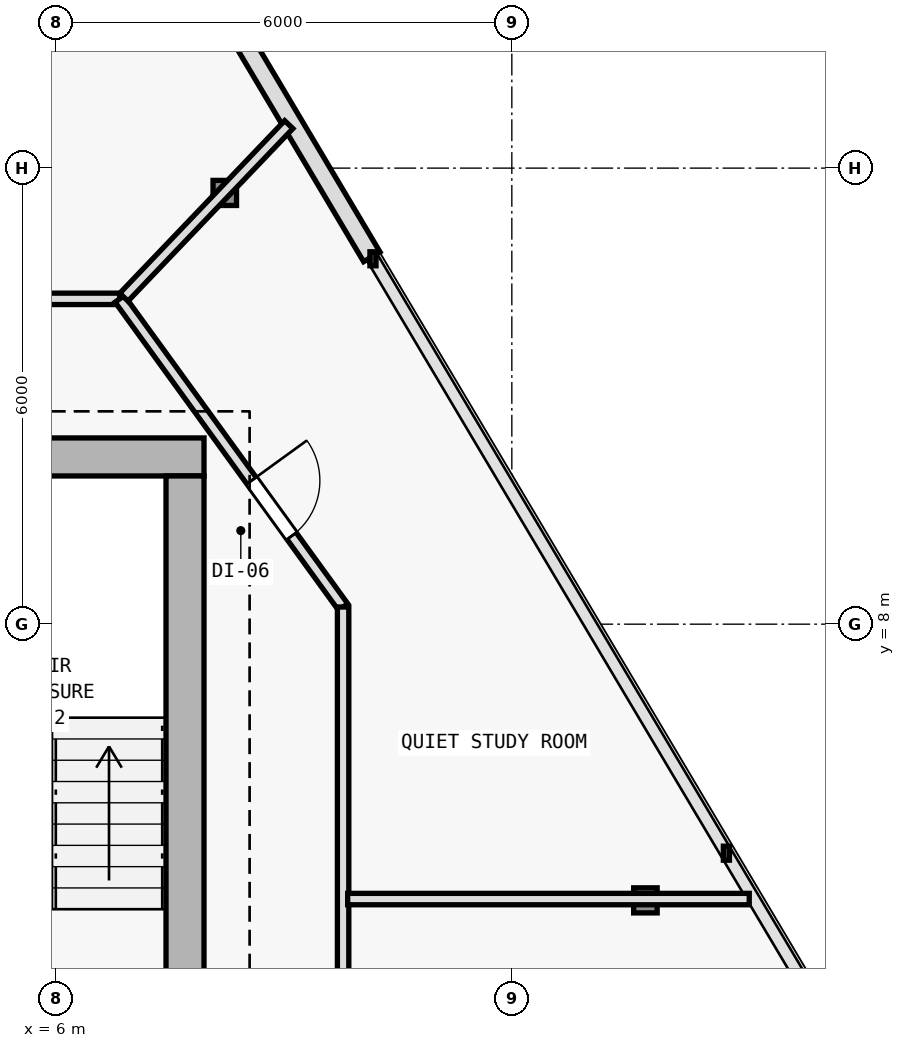
"""IFC4 building model, lengths in metres.
Left out: names, types, materials, properties, quantities, classifications, styles, units other than length and angle.
Written with IfcOpenShell. Run it as: python <this file> out.ifc"""

import sys

from ifc_helpers import new_model, si_unit, direction, frame, frame_2d, origin, origin_2d, place, context, subcontext, project, spatial, rectangle, i_section, extrude, element, fill, save


model = new_model("IFC4")
c1 = context("Model", 3, precision=1e-05, world=origin(), true_north=direction((0.0, 1.0)))
c2 = subcontext(c1, "Body", "Model", "MODEL_VIEW")
j1 = project(units=[si_unit("LENGTHUNIT", "METRE"), si_unit("PLANEANGLEUNIT", "RADIAN")], contexts=[c1])
p1 = place(None, origin())
s1 = spatial("IfcSite", under=j1, at=p1, CompositionType="ELEMENT")
p2 = place(p1, origin())
s2 = spatial("IfcBuilding", under=s1, at=p2, CompositionType="ELEMENT")
p3 = place(p2, frame((0.0, 0.0, 261.6)))
s3 = spatial("IfcBuildingStorey", under=s2, at=p3, CompositionType="ELEMENT", Elevation=261.6)
p4 = place(p3, frame((7.7, 10.2, 0.0), z_axis=(0.0, 0.0, 1.0), x_axis=(1.0, 0.0, 0.0)))
e1 = element("IfcColumn", 1, at=p4, inside=s3, PredefinedType="COLUMN", context=c2, shape_type="SweptSolid", body=[
    extrude(i_section(OverallWidth=0.374, OverallDepth=0.372, WebThickness=0.012, FlangeThickness=0.02, FilletRadius=0.015, at=origin_2d()), origin(), (0.0, 0.0, 1.0), 3.6),
])
p5 = place(p3, frame((13.757, 4.366, 0.005), z_axis=(-0.018906041, 0.009521027842, 0.999775930718), x_axis=(-0.449781931574, -0.893138406984, 0.0)))
e2 = element("IfcColumn", 2, at=p5, inside=s3, PredefinedType="COLUMN", context=c2, shape_type="SweptSolid", body=[
    extrude(i_section(OverallWidth=0.309, OverallDepth=0.33, WebThickness=0.011, FlangeThickness=0.019, FilletRadius=0.027, at=origin_2d()), origin(), (0.0, 0.0, 1.0), 3.59),
])
p6 = place(p3, frame((8.223, 13.674, 0.005), z_axis=(-0.011767052893, -0.002584670578, 0.999927425339), x_axis=(0.214538664031, -0.976715496773, 0.0)))
e3 = element("IfcColumn", 3, at=p6, inside=s3, PredefinedType="COLUMN", context=c2, shape_type="SweptSolid", body=[
    extrude(i_section(OverallWidth=0.309, OverallDepth=0.33, WebThickness=0.011, FlangeThickness=0.019, FilletRadius=0.027, at=origin_2d()), origin(), (0.0, 0.0, 1.0), 3.589),
])
p7 = place(p3, frame((5.24, 21.103, 0.0), z_axis=(0.0, 0.0, 1.0), x_axis=(0.511088566076, -0.859528055171, 0.0)))
e4 = element("IfcWall", 4, at=p7, inside=s3, PredefinedType="SOLIDWALL", context=c2, shape_type="SweptSolid", body=[
    extrude(rectangle(XDim=9.622, YDim=0.25, at=frame_2d((4.811, 0.0))), origin(), (0.0, 0.0, 1.0), 3.35),
])
p8 = place(p7, frame((4.261, 0.0, 0.62)))
e5 = element("IfcOpeningElement", 5, at=p8, cuts=e4, PredefinedType="OPENING", context=c2, shape_type="SweptSolid", body=[
    extrude(rectangle(XDim=1.1, YDim=1.8, at=frame_2d((0.55, 0.9))), frame((0.0, 0.135, 0.0), z_axis=(0.0, -1.0, 0.0), x_axis=(1.0, 0.0, 0.0)), (0.0, 0.0, 1.0), 0.27),
])
p9 = place(p3, frame((7.95, 10.2, 0.0), z_axis=(0.0, 0.0, 1.0), x_axis=(-1.0, 0.0, 0.0)))
e6 = element("IfcWall", 6, at=p9, inside=s3, PredefinedType="SHEAR", context=c2, shape_type="SweptSolid", body=[
    extrude(rectangle(XDim=15.9, YDim=0.5, at=frame_2d((7.95, 0.0))), origin(), (0.0, 0.0, 1.0), 3.35),
])
p10 = place(p9, frame((4.4, 0.0, 0.0)))
e7 = element("IfcOpeningElement", 7, at=p10, cuts=e6, PredefinedType="OPENING", context=c2, shape_type="SweptSolid", body=[
    extrude(rectangle(XDim=1.1, YDim=2.15, at=frame_2d((0.55, 1.075))), frame((0.0, 0.26, 0.0), z_axis=(0.0, -1.0, 0.0), x_axis=(1.0, 0.0, 0.0)), (0.0, 0.0, 1.0), 0.52),
])
p11 = place(p3, frame((7.7, 9.95, 0.0), z_axis=(0.0, 0.0, 1.0), x_axis=(0.0, -1.0, 0.0)))
e8 = element("IfcWall", 8, at=p11, inside=s3, PredefinedType="SHEAR", context=c2, shape_type="SweptSolid", body=[
    extrude(rectangle(XDim=19.1, YDim=0.5, at=frame_2d((9.55, 0.0))), origin(), (0.0, 0.0, 1.0), 3.35),
])
p12 = place(p3, frame((-6.841, 12.28, 0.0), z_axis=(0.0, 0.0, 1.0), x_axis=(1.0, 0.0, 0.0)))
e9 = element("IfcWall", 9, at=p12, inside=s3, PredefinedType="PARTITIONING", context=c2, shape_type="SweptSolid", body=[
    extrude(rectangle(XDim=13.682, YDim=0.15, at=frame_2d((6.841, 0.0))), origin(), (0.0, 0.0, 1.0), 3.015),
])
p13 = place(p12, frame((6.391, 0.0, 0.0)))
e10 = element("IfcOpeningElement", 10, at=p13, cuts=e9, PredefinedType="OPENING", context=c2, shape_type="SweptSolid", body=[
    extrude(rectangle(XDim=0.9, YDim=2.1, at=frame_2d((0.45, 1.05))), frame((0.0, 0.085, 0.0), z_axis=(0.0, -1.0, 0.0), x_axis=(1.0, 0.0, 0.0)), (0.0, 0.0, 1.0), 0.17),
])
p14 = place(p3, frame((6.841, 12.28, 0.0), z_axis=(0.0, 0.0, 1.0), x_axis=(0.586956386413, -0.809618552436, 0.0)))
e11 = element("IfcWall", 11, at=p14, inside=s3, PredefinedType="PARTITIONING", context=c2, shape_type="SweptSolid", body=[
    extrude(rectangle(XDim=5.008, YDim=0.15, at=frame_2d((2.504, 0.0))), origin(), (0.0, 0.0, 1.0), 2.925),
])
p15 = place(p14, frame((2.954, 0.0, 0.0)))
e12 = element("IfcOpeningElement", 12, at=p15, cuts=e11, PredefinedType="OPENING", context=c2, shape_type="SweptSolid", body=[
    extrude(rectangle(XDim=0.9, YDim=2.1, at=frame_2d((0.45, 1.05))), frame((0.0, 0.085, 0.0), z_axis=(0.0, -1.0, 0.0), x_axis=(1.0, 0.0, 0.0)), (0.0, 0.0, 1.0), 0.17),
])
p16 = place(p3, frame((9.78, 8.226, 0.0), z_axis=(0.0, 0.0, 1.0), x_axis=(0.0, -1.0, 0.0)))
e13 = element("IfcWall", 13, at=p16, inside=s3, PredefinedType="PARTITIONING", context=c2, shape_type="SweptSolid", body=[
    extrude(rectangle(XDim=19.706, YDim=0.15, at=frame_2d((9.853, 0.0))), origin(), (0.0, 0.0, 1.0), 2.775),
])
p17 = place(p16, frame((15.072, 0.0, 0.0)))
e14 = element("IfcOpeningElement", 14, at=p17, cuts=e13, PredefinedType="OPENING", context=c2, shape_type="SweptSolid", body=[
    extrude(rectangle(XDim=0.9, YDim=2.1, at=frame_2d((0.45, 1.05))), frame((0.0, 0.085, 0.0), z_axis=(0.0, -1.0, 0.0), x_axis=(1.0, 0.0, 0.0)), (0.0, 0.0, 1.0), 0.17),
])
p18 = place(p16, frame((7.229, 0.0, 0.0)))
e15 = element("IfcOpeningElement", 15, at=p18, cuts=e13, PredefinedType="OPENING", context=c2, shape_type="SweptSolid", body=[
    extrude(rectangle(XDim=0.9, YDim=2.1, at=frame_2d((0.45, 1.05))), frame((0.0, 0.085, 0.0), z_axis=(0.0, -1.0, 0.0), x_axis=(1.0, 0.0, 0.0)), (0.0, 0.0, 1.0), 0.17),
])
p19 = place(p3, frame((9.84, 4.384, 0.0), z_axis=(0.0, 0.0, 1.0), x_axis=(1.0, 0.0, 0.0)))
e16 = element("IfcWall", 16, at=p19, inside=s3, PredefinedType="PARTITIONING", context=c2, shape_type="SweptSolid", body=[
    extrude(rectangle(XDim=5.284, YDim=0.15, at=frame_2d((2.642, 0.0))), origin(), (0.0, 0.0, 1.0), 2.925),
])
p20 = place(p3, frame((6.896, 12.302, 0.0), z_axis=(0.0, 0.0, 1.0), x_axis=(0.690869511938, 0.722979472374, 0.0)))
e17 = element("IfcWall", 17, at=p20, inside=s3, PredefinedType="PARTITIONING", context=c2, shape_type="SweptSolid", body=[
    extrude(rectangle(XDim=3.14, YDim=0.15, at=frame_2d((1.57, 0.0))), origin(), (0.0, 0.0, 1.0), 3.015),
])
p21 = place(p15, origin())
e18 = element("IfcDoor", 18, at=p21, inside=s3, OperationType="SINGLE_SWING_LEFT", PredefinedType="DOOR", context=c2, shape_type="SweptSolid", body=[
    extrude(rectangle(XDim=0.9, YDim=2.1, at=frame_2d((0.45, 1.05))), frame((0.0, 0.025, 0.0), z_axis=(0.0, -1.0, 0.0), x_axis=(1.0, 0.0, 0.0)), (0.0, 0.0, 1.0), 0.05),
])
fill(e12, e18)
save(model, sys.argv[1])
